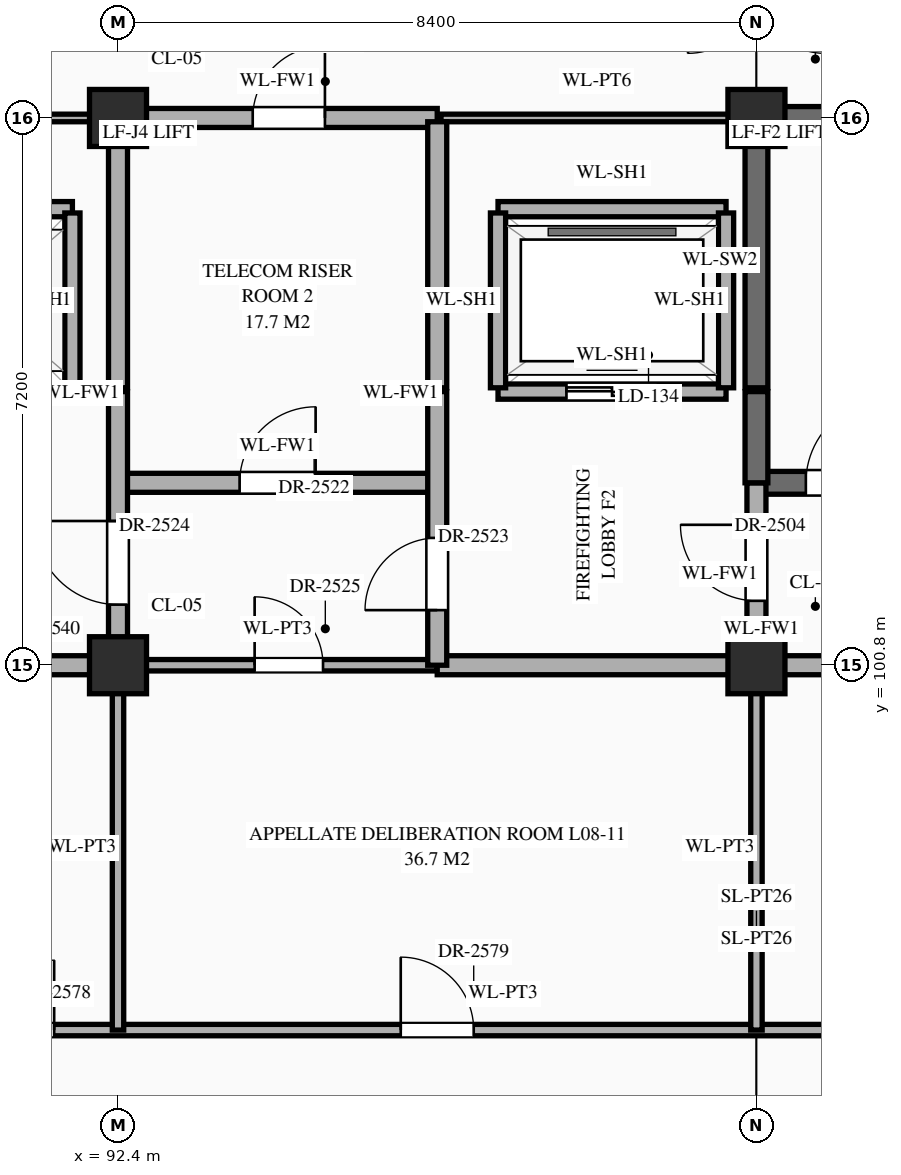
"""IFC4 building model, lengths in metres.
Left out: names, types, materials, properties, quantities, classifications, styles, units other than length and angle.
Written with IfcOpenShell. Run it as: python <this file> out.ifc"""

import sys

from ifc_helpers import new_model, si_unit, direction, frame, frame_2d, origin, origin_2d, place, context, subcontext, project, spatial, rectangle, extrude, element, fill, save


model = new_model("IFC4")
c1 = context("Model", 3, precision=1e-05, world=origin(), true_north=direction((0.0, 1.0)))
c2 = subcontext(c1, "Body", "Model", "MODEL_VIEW")
j1 = project(units=[si_unit("LENGTHUNIT", "METRE"), si_unit("PLANEANGLEUNIT", "RADIAN")], contexts=[c1])
p1 = place(None, origin())
s1 = spatial("IfcSite", under=j1, at=p1, CompositionType="ELEMENT")
p2 = place(p1, origin())
s2 = spatial("IfcBuilding", under=s1, at=p2, CompositionType="ELEMENT")
p3 = place(p2, frame((0.0, 0.0, 35.1)))
s3 = spatial("IfcBuildingStorey", under=s2, at=p3, CompositionType="ELEMENT", Elevation=35.1)
for number, where, z_axis, x_axis in (
    (1, (92.4, 100.8, 0.0), (0.0, 0.0, 1.0), (1.0, 0.0, 0.0)),
    (2, (92.4, 108.0, 0.0), (0.0, 0.0, 1.0), (1.0, 0.0, 0.0)),
    (3, (100.8, 100.8, 0.0), (0.0, 0.0, 1.0), (1.0, 0.0, 0.0)),
    (4, (100.8, 108.0, 0.0), (0.0, 0.0, 1.0), (1.0, 0.0, 0.0)),
):
    element("IfcColumn", number, at=place(p3, frame(where, z_axis=z_axis, x_axis=x_axis)), inside=s3, PredefinedType="COLUMN", context=c2, shape_type="SweptSolid", body=[
        extrude(rectangle(XDim=0.75, YDim=0.75, at=origin_2d()), origin(), (0.0, 0.0, 1.0), 4.2),
    ])
p4 = place(p3, frame((89.8, 96.0, 0.0), z_axis=(0.0, 0.0, 1.0), x_axis=(1.0, 0.0, 0.0)))
e5 = element("IfcWall", 5, at=p4, inside=s3, PredefinedType="STANDARD", context=c2, shape_type="SweptSolid", body=[
    extrude(rectangle(XDim=19.4, YDim=0.15, at=frame_2d((9.7, 0.0))), origin(), (0.0, 0.0, 1.0), 3.95),
])
p5 = place(p4, frame((0.84, 0.0, 0.0)))
e6 = element("IfcOpeningElement", 6, at=p5, cuts=e5, PredefinedType="OPENING", context=c2, shape_type="SweptSolid", body=[
    extrude(rectangle(XDim=0.92, YDim=2.15, at=frame_2d((0.46, 1.075))), frame((0.0, 0.087, 0.0), z_axis=(0.0, -1.0, 0.0), x_axis=(1.0, 0.0, 0.0)), (0.0, 0.0, 1.0), 0.174),
])
p6 = place(p4, frame((6.32, 0.0, 0.0)))
e7 = element("IfcOpeningElement", 7, at=p6, cuts=e5, PredefinedType="OPENING", context=c2, shape_type="SweptSolid", body=[
    extrude(rectangle(XDim=0.96, YDim=2.2, at=frame_2d((0.48, 1.1))), frame((0.0, 0.087, 0.0), z_axis=(0.0, -1.0, 0.0), x_axis=(1.0, 0.0, 0.0)), (0.0, 0.0, 1.0), 0.174),
])
p7 = place(p4, frame((14.7, 0.0, 0.0)))
e8 = element("IfcOpeningElement", 8, at=p7, cuts=e5, PredefinedType="OPENING", context=c2, shape_type="SweptSolid", body=[
    extrude(rectangle(XDim=1.0, YDim=2.25, at=frame_2d((0.5, 1.125))), frame((0.0, 0.087, 0.0), z_axis=(0.0, -1.0, 0.0), x_axis=(1.0, 0.0, 0.0)), (0.0, 0.0, 1.0), 0.174),
])
p8 = place(p3, frame((75.6, 100.8, 0.0), z_axis=(0.0, 0.0, 1.0), x_axis=(1.0, 0.0, 0.0)))
e9 = element("IfcWall", 9, at=p8, inside=s3, PredefinedType="STANDARD", context=c2, shape_type="SweptSolid", body=[
    extrude(rectangle(XDim=16.8, YDim=0.25, at=frame_2d((8.4, 0.0))), origin(), (0.0, 0.0, 1.0), 3.1),
])
p9 = place(p8, frame((3.65, 0.0, 0.0)))
e10 = element("IfcOpeningElement", 10, at=p9, cuts=e9, PredefinedType="OPENING", context=c2, shape_type="SweptSolid", body=[
    extrude(rectangle(XDim=1.1, YDim=2.2, at=frame_2d((0.55, 1.1))), frame((0.0, 0.137, 0.0), z_axis=(0.0, -1.0, 0.0), x_axis=(1.0, 0.0, 0.0)), (0.0, 0.0, 1.0), 0.274),
])
p10 = place(p8, frame((9.772, 0.0, 0.0)))
e11 = element("IfcOpeningElement", 11, at=p10, cuts=e9, PredefinedType="OPENING", context=c2, shape_type="SweptSolid", body=[
    extrude(rectangle(XDim=0.95, YDim=2.15, at=frame_2d((0.475, 1.075))), frame((0.0, 0.137, 0.0), z_axis=(0.0, -1.0, 0.0), x_axis=(1.0, 0.0, 0.0)), (0.0, 0.0, 1.0), 0.274),
])
p11 = place(p8, frame((12.45, 0.0, 0.0)))
e12 = element("IfcOpeningElement", 12, at=p11, cuts=e9, PredefinedType="OPENING", context=c2, shape_type="SweptSolid", body=[
    extrude(rectangle(XDim=1.1, YDim=2.2, at=frame_2d((0.55, 1.1))), frame((0.0, 0.137, 0.0), z_axis=(0.0, -1.0, 0.0), x_axis=(1.0, 0.0, 0.0)), (0.0, 0.0, 1.0), 0.274),
])
p12 = place(p8, frame((14.853, 0.0, 0.0)))
e13 = element("IfcOpeningElement", 13, at=p12, cuts=e9, PredefinedType="OPENING", context=c2, shape_type="SweptSolid", body=[
    extrude(rectangle(XDim=1.0, YDim=2.2, at=frame_2d((0.5, 1.1))), frame((0.0, 0.137, 0.0), z_axis=(0.0, -1.0, 0.0), x_axis=(1.0, 0.0, 0.0)), (0.0, 0.0, 1.0), 0.274),
])
p13 = place(p3, frame((92.4, 100.8, 0.0), z_axis=(0.0, 0.0, 1.0), x_axis=(1.0, 0.0, 0.0)))
e14 = element("IfcWall", 14, at=p13, inside=s3, PredefinedType="STANDARD", context=c2, shape_type="SweptSolid", body=[
    extrude(rectangle(XDim=4.2, YDim=0.15, at=frame_2d((2.1, 0.0))), origin(), (0.0, 0.0, 1.0), 3.1),
])
p14 = place(p13, frame((1.798, 0.0, 0.0)))
e15 = element("IfcOpeningElement", 15, at=p14, cuts=e14, PredefinedType="OPENING", context=c2, shape_type="SweptSolid", body=[
    extrude(rectangle(XDim=0.9, YDim=2.15, at=frame_2d((0.45, 1.075))), frame((0.0, 0.087, 0.0), z_axis=(0.0, -1.0, 0.0), x_axis=(1.0, 0.0, 0.0)), (0.0, 0.0, 1.0), 0.174),
])
p15 = place(p3, frame((96.6, 100.8, 0.0), z_axis=(0.0, 0.0, 1.0), x_axis=(1.0, 0.0, 0.0)))
e16 = element("IfcWall", 16, at=p15, inside=s3, PredefinedType="STANDARD", context=c2, shape_type="SweptSolid", body=[
    extrude(rectangle(XDim=12.6, YDim=0.25, at=frame_2d((6.3, 0.0))), origin(), (0.0, 0.0, 1.0), 3.1),
])
p16 = place(p15, frame((7.85, 0.0, 0.0)))
e17 = element("IfcOpeningElement", 17, at=p16, cuts=e16, PredefinedType="OPENING", context=c2, shape_type="SweptSolid", body=[
    extrude(rectangle(XDim=1.1, YDim=2.2, at=frame_2d((0.55, 1.1))), frame((0.0, 0.137, 0.0), z_axis=(0.0, -1.0, 0.0), x_axis=(1.0, 0.0, 0.0)), (0.0, 0.0, 1.0), 0.274),
])
p17 = place(p3, frame((92.4, 103.2, 0.0), z_axis=(0.0, 0.0, 1.0), x_axis=(1.0, 0.0, 0.0)))
e18 = element("IfcWall", 18, at=p17, inside=s3, PredefinedType="STANDARD", context=c2, shape_type="SweptSolid", body=[
    extrude(rectangle(XDim=4.2, YDim=0.25, at=frame_2d((2.1, 0.0))), origin(), (0.0, 0.0, 1.0), 3.95),
])
p18 = place(p17, frame((1.6, 0.0, 0.0)))
e19 = element("IfcOpeningElement", 19, at=p18, cuts=e18, PredefinedType="OPENING", context=c2, shape_type="SweptSolid", body=[
    extrude(rectangle(XDim=1.0, YDim=2.2, at=frame_2d((0.5, 1.1))), frame((0.0, 0.137, 0.0), z_axis=(0.0, -1.0, 0.0), x_axis=(1.0, 0.0, 0.0)), (0.0, 0.0, 1.0), 0.274),
])
p19 = place(p3, frame((100.8, 103.2, 0.0), z_axis=(0.0, 0.0, 1.0), x_axis=(1.0, 0.0, 0.0)))
e20 = element("IfcWall", 20, at=p19, inside=s3, PredefinedType="SHEAR", context=c2, shape_type="SweptSolid", body=[
    extrude(rectangle(XDim=8.4, YDim=0.3, at=frame_2d((4.2, 0.0))), origin(), (0.0, 0.0, 1.0), 3.95),
])
p20 = place(p19, frame((0.65, 0.0, 0.0)))
e21 = element("IfcOpeningElement", 21, at=p20, cuts=e20, PredefinedType="OPENING", context=c2, shape_type="SweptSolid", body=[
    extrude(rectangle(XDim=1.1, YDim=2.2, at=frame_2d((0.55, 1.1))), frame((0.0, 0.162, 0.0), z_axis=(0.0, -1.0, 0.0), x_axis=(1.0, 0.0, 0.0)), (0.0, 0.0, 1.0), 0.324),
])
p21 = place(p3, frame((89.4, 104.4, 0.0), z_axis=(0.0, 0.0, 1.0), x_axis=(1.0, 0.0, 0.0)))
e22 = element("IfcWall", 22, at=p21, inside=s3, PredefinedType="STANDARD", context=c2, shape_type="SweptSolid", body=[
    extrude(rectangle(XDim=2.4, YDim=0.2, at=frame_2d((1.2, 0.0))), origin(), (0.0, 0.0, 1.0), 3.95),
])
p22 = place(p21, frame((0.7, 0.0, 0.0)))
e23 = element("IfcOpeningElement", 23, at=p22, cuts=e22, PredefinedType="OPENING", context=c2, shape_type="SweptSolid", body=[
    extrude(rectangle(XDim=1.0, YDim=2.15, at=frame_2d((0.5, 1.075))), frame((0.0, 0.112, 0.0), z_axis=(0.0, -1.0, 0.0), x_axis=(1.0, 0.0, 0.0)), (0.0, 0.0, 1.0), 0.224),
])
p23 = place(p3, frame((97.4, 104.4, 0.0), z_axis=(0.0, 0.0, 1.0), x_axis=(1.0, 0.0, 0.0)))
e24 = element("IfcWall", 24, at=p23, inside=s3, PredefinedType="STANDARD", context=c2, shape_type="SweptSolid", body=[
    extrude(rectangle(XDim=3.0, YDim=0.2, at=frame_2d((1.5, 0.0))), origin(), (0.0, 0.0, 1.0), 3.95),
])
p24 = place(p23, frame((0.9, 0.0, 0.0)))
e25 = element("IfcOpeningElement", 25, at=p24, cuts=e24, PredefinedType="OPENING", context=c2, shape_type="SweptSolid", body=[
    extrude(rectangle(XDim=1.2, YDim=2.15, at=frame_2d((0.6, 1.075))), frame((0.0, 0.112, 0.0), z_axis=(0.0, -1.0, 0.0), x_axis=(1.0, 0.0, 0.0)), (0.0, 0.0, 1.0), 0.224),
])
p25 = place(p3, frame((89.4, 106.8, 0.0), z_axis=(0.0, 0.0, 1.0), x_axis=(1.0, 0.0, 0.0)))
e26 = element("IfcWall", 26, at=p25, inside=s3, PredefinedType="STANDARD", context=c2, shape_type="SweptSolid", body=[
    extrude(rectangle(XDim=2.4, YDim=0.2, at=frame_2d((1.2, 0.0))), origin(), (0.0, 0.0, 1.0), 3.95),
])
p26 = place(p3, frame((97.4, 106.8, 0.0), z_axis=(0.0, 0.0, 1.0), x_axis=(1.0, 0.0, 0.0)))
e27 = element("IfcWall", 27, at=p26, inside=s3, PredefinedType="STANDARD", context=c2, shape_type="SweptSolid", body=[
    extrude(rectangle(XDim=3.0, YDim=0.2, at=frame_2d((1.5, 0.0))), origin(), (0.0, 0.0, 1.0), 3.95),
])
p27 = place(p3, frame((86.2, 108.0, 0.0), z_axis=(0.0, 0.0, 1.0), x_axis=(1.0, 0.0, 0.0)))
e28 = element("IfcWall", 28, at=p27, inside=s3, PredefinedType="STANDARD", context=c2, shape_type="SweptSolid", body=[
    extrude(rectangle(XDim=6.15, YDim=0.1, at=frame_2d((3.075, 0.0))), origin(), (0.0, 0.0, 1.0), 3.1),
])
p28 = place(p3, frame((92.4, 108.0, 0.0), z_axis=(0.0, 0.0, 1.0), x_axis=(1.0, 0.0, 0.0)))
e29 = element("IfcWall", 29, at=p28, inside=s3, PredefinedType="STANDARD", context=c2, shape_type="SweptSolid", body=[
    extrude(rectangle(XDim=4.2, YDim=0.25, at=frame_2d((2.1, 0.0))), origin(), (0.0, 0.0, 1.0), 3.1),
])
p29 = place(p28, frame((1.772, 0.0, 0.0)))
e30 = element("IfcOpeningElement", 30, at=p29, cuts=e29, PredefinedType="OPENING", context=c2, shape_type="SweptSolid", body=[
    extrude(rectangle(XDim=0.95, YDim=2.15, at=frame_2d((0.475, 1.075))), frame((0.0, 0.137, 0.0), z_axis=(0.0, -1.0, 0.0), x_axis=(1.0, 0.0, 0.0)), (0.0, 0.0, 1.0), 0.274),
])
p30 = place(p3, frame((96.65, 108.0, 0.0), z_axis=(0.0, 0.0, 1.0), x_axis=(1.0, 0.0, 0.0)))
e31 = element("IfcWall", 31, at=p30, inside=s3, PredefinedType="STANDARD", context=c2, shape_type="SweptSolid", body=[
    extrude(rectangle(XDim=4.1, YDim=0.1, at=frame_2d((2.05, 0.0))), origin(), (0.0, 0.0, 1.0), 3.1),
])
p31 = place(p3, frame((100.8, 108.0, 0.0), z_axis=(0.0, 0.0, 1.0), x_axis=(1.0, 0.0, 0.0)))
e32 = element("IfcWall", 32, at=p31, inside=s3, PredefinedType="SHEAR", context=c2, shape_type="SweptSolid", body=[
    extrude(rectangle(XDim=8.4, YDim=0.3, at=frame_2d((4.2, 0.0))), origin(), (0.0, 0.0, 1.0), 3.95),
])
p32 = place(p3, frame((91.8, 104.45, 0.0), z_axis=(0.0, 0.0, 1.0), x_axis=(0.0, 1.0, 0.0)))
e33 = element("IfcWall", 33, at=p32, inside=s3, PredefinedType="STANDARD", context=c2, shape_type="SweptSolid", body=[
    extrude(rectangle(XDim=2.3, YDim=0.2, at=frame_2d((1.15, 0.0))), origin(), (0.0, 0.0, 1.0), 3.95),
])
p33 = place(p3, frame((92.4, 96.0, 0.0), z_axis=(0.0, 0.0, 1.0), x_axis=(0.0, 1.0, 0.0)))
e34 = element("IfcWall", 34, at=p33, inside=s3, PredefinedType="STANDARD", context=c2, shape_type="SweptSolid", body=[
    extrude(rectangle(XDim=4.8, YDim=0.15, at=frame_2d((2.4, 0.0))), origin(), (0.0, 0.0, 1.0), 3.2),
])
p34 = place(p3, frame((92.4, 100.8, 0.0), z_axis=(0.0, 0.0, 1.0), x_axis=(0.0, 1.0, 0.0)))
e35 = element("IfcWall", 35, at=p34, inside=s3, PredefinedType="STANDARD", context=c2, shape_type="SweptSolid", body=[
    extrude(rectangle(XDim=3.6, YDim=0.25, at=frame_2d((1.8, 0.0))), origin(), (0.0, 0.0, 1.0), 3.2),
])
p35 = place(p34, frame((0.798, 0.0, 0.0)))
e36 = element("IfcOpeningElement", 36, at=p35, cuts=e35, PredefinedType="OPENING", context=c2, shape_type="SweptSolid", body=[
    extrude(rectangle(XDim=1.1, YDim=2.2, at=frame_2d((0.55, 1.1))), frame((0.0, 0.137, 0.0), z_axis=(0.0, -1.0, 0.0), x_axis=(1.0, 0.0, 0.0)), (0.0, 0.0, 1.0), 0.274),
])
p36 = place(p3, frame((92.4, 104.45, 0.0), z_axis=(0.0, 0.0, 1.0), x_axis=(0.0, 1.0, 0.0)))
e37 = element("IfcWall", 37, at=p36, inside=s3, PredefinedType="STANDARD", context=c2, shape_type="SweptSolid", body=[
    extrude(rectangle(XDim=3.5, YDim=0.25, at=frame_2d((1.75, 0.0))), origin(), (0.0, 0.0, 1.0), 3.2),
])
p37 = place(p3, frame((96.6, 100.8, 0.0), z_axis=(0.0, 0.0, 1.0), x_axis=(0.0, 1.0, 0.0)))
e38 = element("IfcWall", 38, at=p37, inside=s3, PredefinedType="STANDARD", context=c2, shape_type="SweptSolid", body=[
    extrude(rectangle(XDim=3.6, YDim=0.25, at=frame_2d((1.8, 0.0))), origin(), (0.0, 0.0, 1.0), 3.95),
])
p38 = place(p37, frame((0.725, 0.0, 0.0)))
e39 = element("IfcOpeningElement", 39, at=p38, cuts=e38, PredefinedType="OPENING", context=c2, shape_type="SweptSolid", body=[
    extrude(rectangle(XDim=0.95, YDim=2.15, at=frame_2d((0.475, 1.075))), frame((0.0, 0.137, 0.0), z_axis=(0.0, -1.0, 0.0), x_axis=(1.0, 0.0, 0.0)), (0.0, 0.0, 1.0), 0.274),
])
p39 = place(p3, frame((96.6, 104.45, 0.0), z_axis=(0.0, 0.0, 1.0), x_axis=(0.0, 1.0, 0.0)))
e40 = element("IfcWall", 40, at=p39, inside=s3, PredefinedType="STANDARD", context=c2, shape_type="SweptSolid", body=[
    extrude(rectangle(XDim=3.5, YDim=0.25, at=frame_2d((1.75, 0.0))), origin(), (0.0, 0.0, 1.0), 3.95),
])
for number, where, z_axis, x_axis in (
    (41, (97.4, 104.45, 0.0), (0.0, 0.0, 1.0), (0.0, 1.0, 0.0)),
    (42, (100.4, 104.45, 0.0), (0.0, 0.0, 1.0), (0.0, 1.0, 0.0)),
):
    element("IfcWall", number, at=place(p3, frame(where, z_axis=z_axis, x_axis=x_axis)), inside=s3, PredefinedType="STANDARD", context=c2, shape_type="SweptSolid", body=[
        extrude(rectangle(XDim=2.3, YDim=0.2, at=frame_2d((1.15, 0.0))), origin(), (0.0, 0.0, 1.0), 3.95),
    ])
p40 = place(p3, frame((100.8, 96.0, 0.0), z_axis=(0.0, 0.0, 1.0), x_axis=(0.0, 1.0, 0.0)))
e43 = element("IfcWall", 43, at=p40, inside=s3, PredefinedType="STANDARD", context=c2, shape_type="SweptSolid", body=[
    extrude(rectangle(XDim=4.8, YDim=0.15, at=frame_2d((2.4, 0.0))), origin(), (0.0, 0.0, 1.0), 3.2),
])
p41 = place(p3, frame((100.8, 100.8, 0.0), z_axis=(0.0, 0.0, 1.0), x_axis=(0.0, 1.0, 0.0)))
e44 = element("IfcWall", 44, at=p41, inside=s3, PredefinedType="STANDARD", context=c2, shape_type="SweptSolid", body=[
    extrude(rectangle(XDim=2.4, YDim=0.25, at=frame_2d((1.2, 0.0))), origin(), (0.0, 0.0, 1.0), 3.2),
])
p42 = place(p41, frame((0.847, 0.0, 0.0)))
e45 = element("IfcOpeningElement", 45, at=p42, cuts=e44, PredefinedType="OPENING", context=c2, shape_type="SweptSolid", body=[
    extrude(rectangle(XDim=1.0, YDim=2.2, at=frame_2d((0.5, 1.1))), frame((0.0, 0.137, 0.0), z_axis=(0.0, -1.0, 0.0), x_axis=(1.0, 0.0, 0.0)), (0.0, 0.0, 1.0), 0.274),
])
p43 = place(p3, frame((100.8, 103.2, 0.0), z_axis=(0.0, 0.0, 1.0), x_axis=(0.0, 1.0, 0.0)))
e46 = element("IfcWall", 46, at=p43, inside=s3, PredefinedType="SHEAR", context=c2, shape_type="SweptSolid", body=[
    extrude(rectangle(XDim=1.2, YDim=0.3, at=frame_2d((0.6, 0.0))), origin(), (0.0, 0.0, 1.0), 3.95),
])
p44 = place(p3, frame((100.8, 104.45, 0.0), z_axis=(0.0, 0.0, 1.0), x_axis=(0.0, 1.0, 0.0)))
e47 = element("IfcWall", 47, at=p44, inside=s3, PredefinedType="SHEAR", context=c2, shape_type="SweptSolid", body=[
    extrude(rectangle(XDim=3.5, YDim=0.3, at=frame_2d((1.75, 0.0))), origin(), (0.0, 0.0, 1.0), 3.95),
])
p45 = place(p24, origin())
e48 = element("IfcDoor", 48, at=p45, inside=s3, OperationType="DOUBLE_DOOR_SLIDING", PredefinedType="DOOR", context=c2, shape_type="SweptSolid", body=[
    extrude(rectangle(XDim=1.2, YDim=2.15, at=frame_2d((0.6, 1.075))), frame((0.0, 0.025, 0.0), z_axis=(0.0, -1.0, 0.0), x_axis=(1.0, 0.0, 0.0)), (0.0, 0.0, 1.0), 0.05),
])
fill(e25, e48)
p46 = place(p20, origin())
e49 = element("IfcDoor", 49, at=p46, inside=s3, OperationType="SINGLE_SWING_RIGHT", PredefinedType="DOOR", context=c2, shape_type="SweptSolid", body=[
    extrude(rectangle(XDim=1.1, YDim=2.2, at=frame_2d((0.55, 1.1))), frame((0.0, 0.025, 0.0), z_axis=(0.0, -1.0, 0.0), x_axis=(1.0, 0.0, 0.0)), (0.0, 0.0, 1.0), 0.05),
])
fill(e21, e49)
p47 = place(p42, origin())
e50 = element("IfcDoor", 50, at=p47, inside=s3, OperationType="SINGLE_SWING_RIGHT", PredefinedType="DOOR", context=c2, shape_type="SweptSolid", body=[
    extrude(rectangle(XDim=1.0, YDim=2.2, at=frame_2d((0.5, 1.1))), frame((0.0, 0.025, 0.0), z_axis=(0.0, -1.0, 0.0), x_axis=(1.0, 0.0, 0.0)), (0.0, 0.0, 1.0), 0.05),
])
fill(e45, e50)
p48 = place(p18, origin())
e51 = element("IfcDoor", 51, at=p48, inside=s3, OperationType="SINGLE_SWING_RIGHT", PredefinedType="DOOR", context=c2, shape_type="SweptSolid", body=[
    extrude(rectangle(XDim=1.0, YDim=2.2, at=frame_2d((0.5, 1.1))), frame((0.0, 0.025, 0.0), z_axis=(0.0, -1.0, 0.0), x_axis=(1.0, 0.0, 0.0)), (0.0, 0.0, 1.0), 0.05),
])
fill(e19, e51)
p49 = place(p38, origin())
e52 = element("IfcDoor", 52, at=p49, inside=s3, OperationType="SINGLE_SWING_LEFT", PredefinedType="DOOR", context=c2, shape_type="SweptSolid", body=[
    extrude(rectangle(XDim=0.95, YDim=2.15, at=frame_2d((0.475, 1.075))), frame((0.0, 0.025, 0.0), z_axis=(0.0, -1.0, 0.0), x_axis=(1.0, 0.0, 0.0)), (0.0, 0.0, 1.0), 0.05),
])
fill(e39, e52)
p50 = place(p35, origin())
e53 = element("IfcDoor", 53, at=p50, inside=s3, OperationType="SINGLE_SWING_RIGHT", PredefinedType="DOOR", context=c2, shape_type="SweptSolid", body=[
    extrude(rectangle(XDim=1.1, YDim=2.2, at=frame_2d((0.55, 1.1))), frame((0.0, 0.025, 0.0), z_axis=(0.0, -1.0, 0.0), x_axis=(1.0, 0.0, 0.0)), (0.0, 0.0, 1.0), 0.05),
])
fill(e36, e53)
p51 = place(p14, origin())
e54 = element("IfcDoor", 54, at=p51, inside=s3, OperationType="SINGLE_SWING_LEFT", PredefinedType="DOOR", context=c2, shape_type="SweptSolid", body=[
    extrude(rectangle(XDim=0.9, YDim=2.15, at=frame_2d((0.45, 1.075))), frame((0.0, 0.025, 0.0), z_axis=(0.0, -1.0, 0.0), x_axis=(1.0, 0.0, 0.0)), (0.0, 0.0, 1.0), 0.05),
])
fill(e15, e54)
p52 = place(p29, origin())
e55 = element("IfcDoor", 55, at=p52, inside=s3, OperationType="SINGLE_SWING_RIGHT", PredefinedType="DOOR", context=c2, shape_type="SweptSolid", body=[
    extrude(rectangle(XDim=0.95, YDim=2.15, at=frame_2d((0.475, 1.075))), frame((0.0, 0.025, 0.0), z_axis=(0.0, -1.0, 0.0), x_axis=(1.0, 0.0, 0.0)), (0.0, 0.0, 1.0), 0.05),
])
fill(e30, e55)
p53 = place(p5, origin())
e56 = element("IfcDoor", 56, at=p53, inside=s3, OperationType="SINGLE_SWING_RIGHT", PredefinedType="DOOR", context=c2, shape_type="SweptSolid", body=[
    extrude(rectangle(XDim=0.92, YDim=2.15, at=frame_2d((0.46, 1.075))), frame((0.0, 0.025, 0.0), z_axis=(0.0, -1.0, 0.0), x_axis=(1.0, 0.0, 0.0)), (0.0, 0.0, 1.0), 0.05),
])
fill(e6, e56)
p54 = place(p6, origin())
e57 = element("IfcDoor", 57, at=p54, inside=s3, OperationType="SINGLE_SWING_LEFT", PredefinedType="DOOR", context=c2, shape_type="SweptSolid", body=[
    extrude(rectangle(XDim=0.96, YDim=2.2, at=frame_2d((0.48, 1.1))), frame((0.0, 0.025, 0.0), z_axis=(0.0, -1.0, 0.0), x_axis=(1.0, 0.0, 0.0)), (0.0, 0.0, 1.0), 0.05),
])
fill(e7, e57)
save(model, sys.argv[1])
